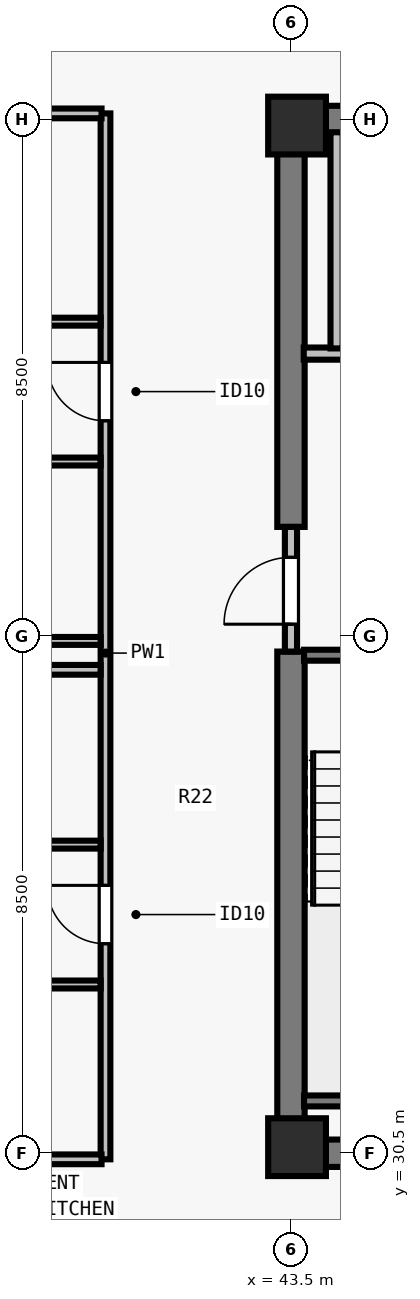
"""IFC4 building model, lengths in metres.
Left out: names, types, materials, properties, quantities, classifications, styles, units other than length and angle.
Written with IfcOpenShell. Run it as: python <this file> out.ifc"""

import sys

from ifc_helpers import new_model, si_unit, direction, frame, frame_2d, origin, origin_2d, place, context, subcontext, project, spatial, rectangle, extrude, element, fill, save


model = new_model("IFC4")
c1 = context("Model", 3, precision=1e-05, world=origin(), true_north=direction((0.0, 1.0)))
c2 = subcontext(c1, "Body", "Model", "MODEL_VIEW")
j1 = project(units=[si_unit("LENGTHUNIT", "METRE"), si_unit("PLANEANGLEUNIT", "RADIAN")], contexts=[c1])
p1 = place(None, origin())
s1 = spatial("IfcSite", under=j1, at=p1, CompositionType="ELEMENT")
p2 = place(p1, origin())
s2 = spatial("IfcBuilding", under=s1, at=p2, CompositionType="ELEMENT")
p3 = place(p2, frame((0.0, 0.0, 251.5)))
s3 = spatial("IfcBuildingStorey", under=s2, at=p3, CompositionType="ELEMENT", Elevation=251.5)
for number, where, z_axis, x_axis in (
    (1, (43.6, 30.6, 0.0), (0.0, 0.0, 1.0), (1.0, 0.0, 0.0)),
    (2, (43.6, 47.4, 0.0), (0.0, 0.0, 1.0), (1.0, 0.0, 0.0)),
):
    element("IfcColumn", number, at=place(p3, frame(where, z_axis=z_axis, x_axis=x_axis)), inside=s3, PredefinedType="COLUMN", context=c2, shape_type="SweptSolid", body=[
        extrude(rectangle(XDim=0.95, YDim=0.95, at=origin_2d()), origin(), (0.0, 0.0, 1.0), 3.5),
    ])
for number, where, z_axis, x_axis in (
    (3, (43.275, 30.5, 0.0), (0.0, 0.0, 1.0), (1.0, 0.0, 0.0)),
    (4, (43.275, 47.5, 0.0), (0.0, 0.0, 1.0), (1.0, 0.0, 0.0)),
):
    element("IfcWall", number, at=place(p3, frame(where, z_axis=z_axis, x_axis=x_axis)), inside=s3, PredefinedType="SHEAR", context=c2, shape_type="SweptSolid", body=[
        extrude(rectangle(XDim=17.45, YDim=0.45, at=frame_2d((8.725, 0.0))), origin(), (0.0, 0.0, 1.0), 3.29),
    ])
p4 = place(p3, frame((43.5, 30.715, 0.0), z_axis=(0.0, 0.0, 1.0), x_axis=(0.0, 1.0, 0.0)))
e5 = element("IfcWall", 5, at=p4, inside=s3, PredefinedType="SHEAR", context=c2, shape_type="SweptSolid", body=[
    extrude(rectangle(XDim=8.035, YDim=0.45, at=frame_2d((4.018, 0.0))), origin(), (0.0, 0.0, 1.0), 3.29),
])
p5 = place(p3, frame((43.5, 40.8, 0.0), z_axis=(0.0, 0.0, 1.0), x_axis=(0.0, 1.0, 0.0)))
e6 = element("IfcWall", 6, at=p5, inside=s3, PredefinedType="SHEAR", context=c2, shape_type="SweptSolid", body=[
    extrude(rectangle(XDim=6.485, YDim=0.45, at=frame_2d((3.242, 0.0))), origin(), (0.0, 0.0, 1.0), 3.29),
])
p6 = place(p3, frame((43.5, 38.75, 0.0), z_axis=(0.0, 0.0, 1.0), x_axis=(0.0, 1.0, 0.0)))
e7 = element("IfcWall", 7, at=p6, inside=s3, PredefinedType="SOLIDWALL", context=c2, shape_type="SweptSolid", body=[
    extrude(rectangle(XDim=2.05, YDim=0.2, at=frame_2d((1.025, 0.0))), origin(), (0.0, 0.0, 1.0), 3.29),
])
p7 = place(p6, frame((0.45, 0.0, 0.0)))
e8 = element("IfcOpeningElement", 8, at=p7, cuts=e7, PredefinedType="OPENING", context=c2, shape_type="SweptSolid", body=[
    extrude(rectangle(XDim=1.1, YDim=2.15, at=frame_2d((0.55, 1.075))), frame((0.0, 0.11, 0.0), z_axis=(0.0, -1.0, 0.0), x_axis=(1.0, 0.0, 0.0)), (0.0, 0.0, 1.0), 0.22),
])
p8 = place(p3, frame((43.71, 43.65, 0.0), z_axis=(0.0, 0.0, 1.0), x_axis=(1.0, 0.0, 0.0)))
e9 = element("IfcWall", 9, at=p8, inside=s3, PredefinedType="SOLIDWALL", context=c2, shape_type="SweptSolid", body=[
    extrude(rectangle(XDim=3.555, YDim=0.2, at=frame_2d((1.777, 0.0))), origin(), (0.0, 0.0, 1.0), 3.29),
])
p9 = place(p8, frame((1.16, 0.0, 0.0)))
e10 = element("IfcOpeningElement", 10, at=p9, cuts=e9, PredefinedType="OPENING", context=c2, shape_type="SweptSolid", body=[
    extrude(rectangle(XDim=1.1, YDim=2.2, at=frame_2d((0.55, 1.1))), frame((0.0, 0.11, 0.0), z_axis=(0.0, -1.0, 0.0), x_axis=(1.0, 0.0, 0.0)), (0.0, 0.0, 1.0), 0.22),
])
p10 = place(p3, frame((44.25, 43.735, 0.0), z_axis=(0.0, 0.0, 1.0), x_axis=(0.0, 1.0, 0.0)))
e11 = element("IfcWall", 11, at=p10, inside=s3, PredefinedType="SOLIDWALL", context=c2, shape_type="SweptSolid", body=[
    extrude(rectangle(XDim=3.555, YDim=0.2, at=frame_2d((1.777, 0.0))), origin(), (0.0, 0.0, 1.0), 3.29),
])
p11 = place(p3, frame((40.45, 30.4, 0.0), z_axis=(0.0, 0.0, 1.0), x_axis=(0.0, 1.0, 0.0)))
e12 = element("IfcWall", 12, at=p11, inside=s3, PredefinedType="PARTITIONING", context=c2, shape_type="SweptSolid", body=[
    extrude(rectangle(XDim=17.2, YDim=0.16, at=frame_2d((8.6, 0.0))), origin(), (0.0, 0.0, 1.0), 3.29),
])
p12 = place(p11, frame((3.545, 0.0, 0.0)))
e13 = element("IfcOpeningElement", 13, at=p12, cuts=e12, PredefinedType="OPENING", context=c2, shape_type="SweptSolid", body=[
    extrude(rectangle(XDim=0.96, YDim=2.18, at=frame_2d((0.48, 1.09))), frame((0.0, 0.09, 0.0), z_axis=(0.0, -1.0, 0.0), x_axis=(1.0, 0.0, 0.0)), (0.0, 0.0, 1.0), 0.18),
])
p13 = place(p11, frame((12.145, 0.0, 0.0)))
e14 = element("IfcOpeningElement", 14, at=p13, cuts=e12, PredefinedType="OPENING", context=c2, shape_type="SweptSolid", body=[
    extrude(rectangle(XDim=0.96, YDim=2.18, at=frame_2d((0.48, 1.09))), frame((0.0, 0.09, 0.0), z_axis=(0.0, -1.0, 0.0), x_axis=(1.0, 0.0, 0.0)), (0.0, 0.0, 1.0), 0.18),
])
p14 = place(p3, frame((29.77, 30.4, 0.0), z_axis=(0.0, 0.0, 1.0), x_axis=(1.0, 0.0, 0.0)))
e15 = element("IfcWall", 15, at=p14, inside=s3, PredefinedType="PARTITIONING", context=c2, shape_type="SweptSolid", body=[
    extrude(rectangle(XDim=10.615, YDim=0.16, at=frame_2d((5.308, 0.0))), origin(), (0.0, 0.0, 1.0), 3.29),
])
p15 = place(p3, frame((29.805, 47.6, 0.0), z_axis=(0.0, 0.0, 1.0), x_axis=(1.0, 0.0, 0.0)))
e16 = element("IfcWall", 16, at=p15, inside=s3, PredefinedType="PARTITIONING", context=c2, shape_type="SweptSolid", body=[
    extrude(rectangle(XDim=10.58, YDim=0.16, at=frame_2d((5.29, 0.0))), origin(), (0.0, 0.0, 1.0), 3.29),
])
p16 = place(p3, frame((29.805, 38.45, 0.0), z_axis=(0.0, 0.0, 1.0), x_axis=(1.0, 0.0, 0.0)))
e17 = element("IfcWall", 17, at=p16, inside=s3, PredefinedType="PARTITIONING", context=c2, shape_type="SweptSolid", body=[
    extrude(rectangle(XDim=10.565, YDim=0.16, at=frame_2d((5.283, 0.0))), origin(), (0.0, 0.0, 1.0), 2.958),
])
p17 = place(p3, frame((37.62, 33.275, 0.0), z_axis=(0.0, 0.0, 1.0), x_axis=(1.0, 0.0, 0.0)))
e18 = element("IfcWall", 18, at=p17, inside=s3, PredefinedType="PLUMBINGWALL", context=c2, shape_type="SweptSolid", body=[
    extrude(rectangle(XDim=2.75, YDim=0.13, at=frame_2d((1.375, 0.0))), origin(), (0.0, 0.0, 1.0), 3.29),
])
p18 = place(p17, frame((0.55, 0.0, 0.0)))
e19 = element("IfcOpeningElement", 19, at=p18, cuts=e18, PredefinedType="OPENING", context=c2, shape_type="SweptSolid", body=[
    extrude(rectangle(XDim=0.85, YDim=2.08, at=frame_2d((0.425, 1.04))), frame((0.0, 0.075, 0.0), z_axis=(0.0, -1.0, 0.0), x_axis=(1.0, 0.0, 0.0)), (0.0, 0.0, 1.0), 0.15),
])
p19 = place(p3, frame((37.62, 35.575, 0.0), z_axis=(0.0, 0.0, 1.0), x_axis=(1.0, 0.0, 0.0)))
e20 = element("IfcWall", 20, at=p19, inside=s3, PredefinedType="PLUMBINGWALL", context=c2, shape_type="SweptSolid", body=[
    extrude(rectangle(XDim=2.75, YDim=0.13, at=frame_2d((1.375, 0.0))), origin(), (0.0, 0.0, 1.0), 3.29),
])
p20 = place(p19, frame((0.55, 0.0, 0.0)))
e21 = element("IfcOpeningElement", 21, at=p20, cuts=e20, PredefinedType="OPENING", context=c2, shape_type="SweptSolid", body=[
    extrude(rectangle(XDim=0.88, YDim=2.1, at=frame_2d((0.44, 1.05))), frame((0.0, 0.075, 0.0), z_axis=(0.0, -1.0, 0.0), x_axis=(1.0, 0.0, 0.0)), (0.0, 0.0, 1.0), 0.15),
])
p21 = place(p3, frame((37.62, 38.925, 0.0), z_axis=(0.0, 0.0, 1.0), x_axis=(1.0, 0.0, 0.0)))
e22 = element("IfcWall", 22, at=p21, inside=s3, PredefinedType="PLUMBINGWALL", context=c2, shape_type="SweptSolid", body=[
    extrude(rectangle(XDim=2.75, YDim=0.13, at=frame_2d((1.375, 0.0))), origin(), (0.0, 0.0, 1.0), 3.29),
])
p22 = place(p3, frame((37.62, 41.875, 0.0), z_axis=(0.0, 0.0, 1.0), x_axis=(1.0, 0.0, 0.0)))
e23 = element("IfcWall", 23, at=p22, inside=s3, PredefinedType="PLUMBINGWALL", context=c2, shape_type="SweptSolid", body=[
    extrude(rectangle(XDim=2.75, YDim=0.13, at=frame_2d((1.375, 0.0))), origin(), (0.0, 0.0, 1.0), 2.958),
])
p23 = place(p22, frame((0.55, 0.0, 0.0)))
e24 = element("IfcOpeningElement", 24, at=p23, cuts=e23, PredefinedType="OPENING", context=c2, shape_type="SweptSolid", body=[
    extrude(rectangle(XDim=0.85, YDim=2.08, at=frame_2d((0.425, 1.04))), frame((0.0, 0.075, 0.0), z_axis=(0.0, -1.0, 0.0), x_axis=(1.0, 0.0, 0.0)), (0.0, 0.0, 1.0), 0.15),
])
p24 = place(p3, frame((37.62, 44.175, 0.0), z_axis=(0.0, 0.0, 1.0), x_axis=(1.0, 0.0, 0.0)))
e25 = element("IfcWall", 25, at=p24, inside=s3, PredefinedType="PLUMBINGWALL", context=c2, shape_type="SweptSolid", body=[
    extrude(rectangle(XDim=2.75, YDim=0.13, at=frame_2d((1.375, 0.0))), origin(), (0.0, 0.0, 1.0), 2.958),
])
p25 = place(p24, frame((0.55, 0.0, 0.0)))
e26 = element("IfcOpeningElement", 26, at=p25, cuts=e25, PredefinedType="OPENING", context=c2, shape_type="SweptSolid", body=[
    extrude(rectangle(XDim=0.88, YDim=2.1, at=frame_2d((0.44, 1.05))), frame((0.0, 0.075, 0.0), z_axis=(0.0, -1.0, 0.0), x_axis=(1.0, 0.0, 0.0)), (0.0, 0.0, 1.0), 0.15),
])
p26 = place(p3, frame((43.715, 38.69, 0.0), z_axis=(0.0, 0.0, 1.0), x_axis=(1.0, 0.0, 0.0)))
e27 = element("IfcWall", 27, at=p26, inside=s3, PredefinedType="SOLIDWALL", context=c2, shape_type="SweptSolid", body=[
    extrude(rectangle(XDim=3.28, YDim=0.18, at=frame_2d((1.64, 0.0))), origin(), (0.0, 0.0, 1.0), 3.29),
])
p27 = place(p26, frame((1.165, 0.0, 0.0)))
e28 = element("IfcOpeningElement", 28, at=p27, cuts=e27, PredefinedType="OPENING", context=c2, shape_type="SweptSolid", body=[
    extrude(rectangle(XDim=0.95, YDim=2.15, at=frame_2d((0.475, 1.075))), frame((0.0, 0.1, 0.0), z_axis=(0.0, -1.0, 0.0), x_axis=(1.0, 0.0, 0.0)), (0.0, 0.0, 1.0), 0.2),
])
p28 = place(p3, frame((43.715, 31.36, 0.0), z_axis=(0.0, 0.0, 1.0), x_axis=(1.0, 0.0, 0.0)))
e29 = element("IfcWall", 29, at=p28, inside=s3, PredefinedType="SOLIDWALL", context=c2, shape_type="SweptSolid", body=[
    extrude(rectangle(XDim=3.28, YDim=0.18, at=frame_2d((1.64, 0.0))), origin(), (0.0, 0.0, 1.0), 3.29),
])
p29 = place(p7, origin())
e30 = element("IfcDoor", 30, at=p29, inside=s3, OperationType="SINGLE_SWING_LEFT", PredefinedType="DOOR", context=c2, shape_type="SweptSolid", body=[
    extrude(rectangle(XDim=1.1, YDim=2.15, at=frame_2d((0.55, 1.075))), frame((0.0, 0.025, 0.0), z_axis=(0.0, -1.0, 0.0), x_axis=(1.0, 0.0, 0.0)), (0.0, 0.0, 1.0), 0.05),
])
fill(e8, e30)
p30 = place(p12, origin())
e31 = element("IfcDoor", 31, at=p30, inside=s3, OperationType="SINGLE_SWING_RIGHT", PredefinedType="DOOR", context=c2, shape_type="SweptSolid", body=[
    extrude(rectangle(XDim=0.96, YDim=2.18, at=frame_2d((0.48, 1.09))), frame((0.0, 0.025, 0.0), z_axis=(0.0, -1.0, 0.0), x_axis=(1.0, 0.0, 0.0)), (0.0, 0.0, 1.0), 0.05),
])
fill(e13, e31)
p31 = place(p13, origin())
e32 = element("IfcDoor", 32, at=p31, inside=s3, OperationType="SINGLE_SWING_RIGHT", PredefinedType="DOOR", context=c2, shape_type="SweptSolid", body=[
    extrude(rectangle(XDim=0.96, YDim=2.18, at=frame_2d((0.48, 1.09))), frame((0.0, 0.025, 0.0), z_axis=(0.0, -1.0, 0.0), x_axis=(1.0, 0.0, 0.0)), (0.0, 0.0, 1.0), 0.05),
])
fill(e14, e32)
save(model, sys.argv[1])
